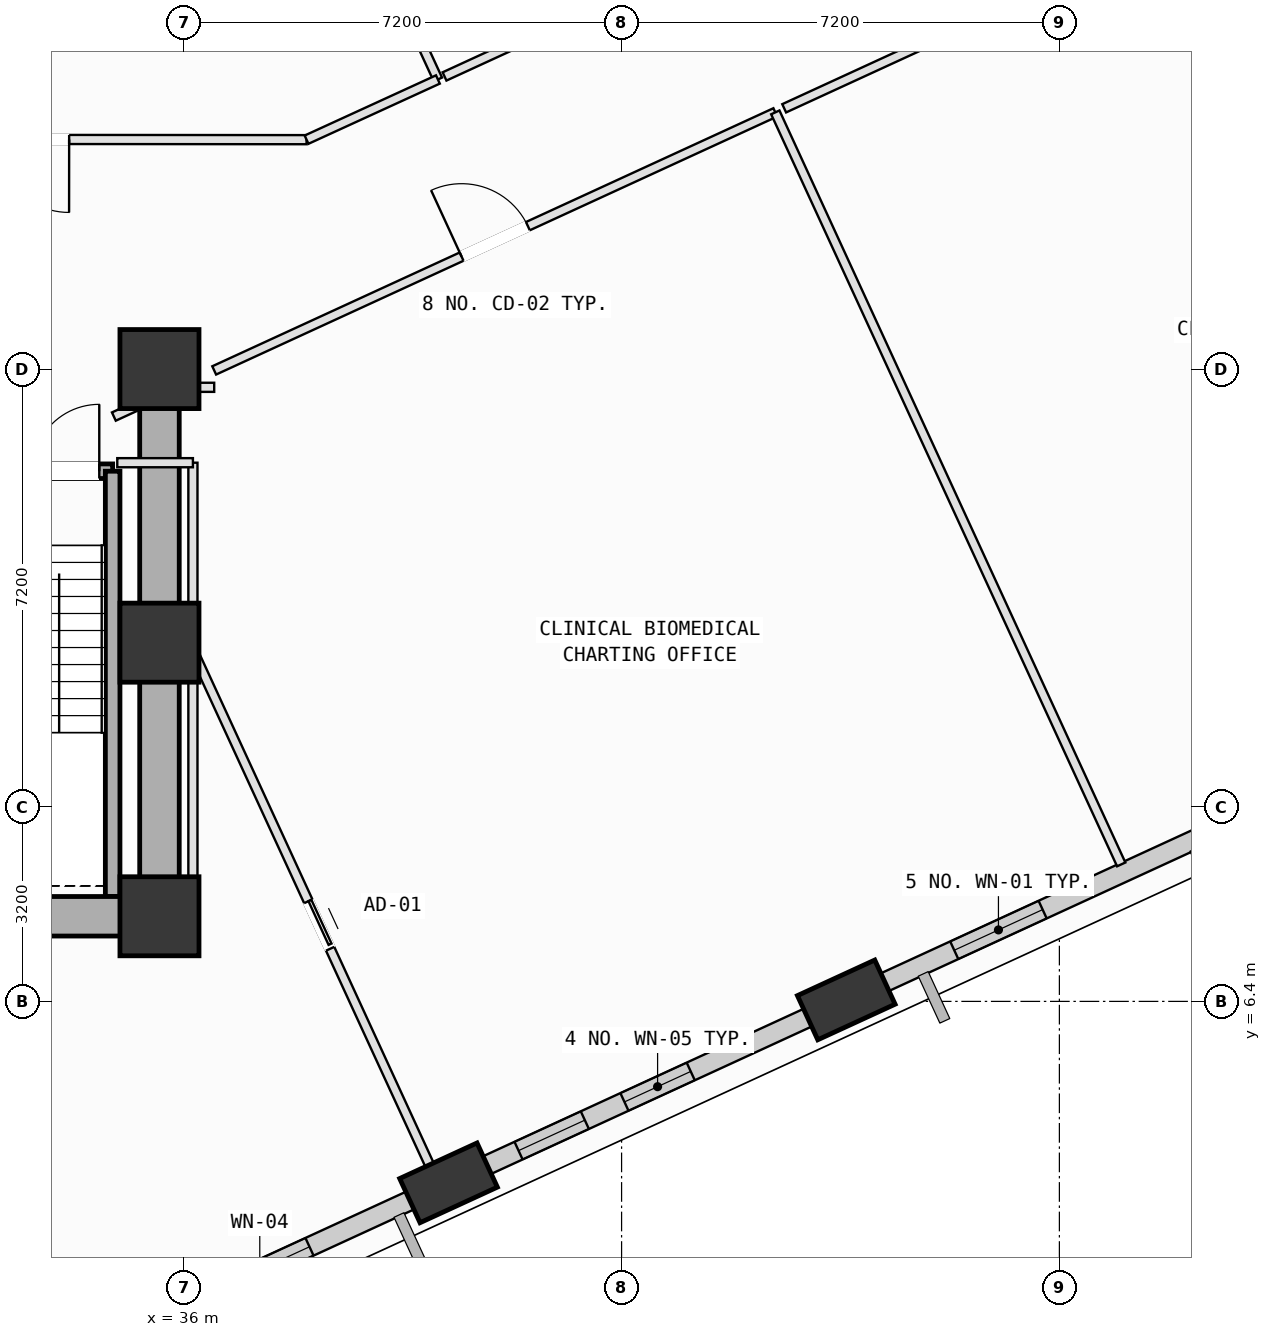
"""IFC4 building model, lengths in metres.
Left out: names, types, materials, properties, quantities, classifications, styles, units other than length and angle.
Written with IfcOpenShell. Run it as: python <this file> out.ifc"""

import sys

from ifc_helpers import new_model, si_unit, direction, frame, frame_2d, origin, origin_2d, place, context, subcontext, project, spatial, rectangle, extrude, element, fill, save


model = new_model("IFC4")
c1 = context("Model", 3, precision=1e-05, world=origin(), true_north=direction((0.0, 1.0)))
c2 = subcontext(c1, "Body", "Model", "MODEL_VIEW")
j1 = project(units=[si_unit("LENGTHUNIT", "METRE"), si_unit("PLANEANGLEUNIT", "RADIAN")], contexts=[c1])
p1 = place(None, origin())
s1 = spatial("IfcSite", under=j1, at=p1, CompositionType="ELEMENT")
p2 = place(p1, origin())
s2 = spatial("IfcBuilding", under=s1, at=p2, CompositionType="ELEMENT")
p3 = place(p2, frame((0.0, 0.0, 128.4)))
s3 = spatial("IfcBuildingStorey", under=s2, at=p3, CompositionType="ELEMENT", Elevation=128.4)
for number, where, z_axis, x_axis in (
    (1, (35.6, 7.8, 0.0), (0.0, 0.0, 1.0), (1.0, 0.0, 0.0)),
    (2, (35.6, 12.3, 0.0), (0.0, 0.0, 1.0), (1.0, 0.0, 0.0)),
    (3, (35.6, 16.8, 0.0), (0.0, 0.0, 1.0), (1.0, 0.0, 0.0)),
):
    element("IfcColumn", number, at=place(p3, frame(where, z_axis=z_axis, x_axis=x_axis)), inside=s3, PredefinedType="COLUMN", context=c2, shape_type="SweptSolid", body=[
        extrude(rectangle(XDim=1.3, YDim=1.3, at=origin_2d()), origin(), (0.0, 0.0, 1.0), 4.0),
    ])
p4 = place(p3, frame((40.354, 3.416, 0.002), z_axis=(0.088079787363, 0.028589433744, 0.995703065847), x_axis=(-0.6762297201, 0.735673833604, 0.038695945562)))
e4 = element("IfcColumn", 4, at=p4, inside=s3, PredefinedType="COLUMN", context=c2, shape_type="SweptSolid", body=[
    extrude(rectangle(XDim=1.4, YDim=0.8, at=origin_2d()), origin(), (0.0, 0.0, 1.0), 4.014),
])
p5 = place(p3, frame((46.895, 6.424, 0.002), z_axis=(0.075419968591, 0.055530993003, 0.995604407962), x_axis=(-0.873680391511, 0.484923595173, 0.039136687829)))
e5 = element("IfcColumn", 5, at=p5, inside=s3, PredefinedType="COLUMN", context=c2, shape_type="SweptSolid", body=[
    extrude(rectangle(XDim=1.4, YDim=0.8, at=origin_2d()), origin(), (0.0, 0.0, 1.0), 4.014),
])
p6 = place(p3, frame((40.071, 3.286, 0.0), z_axis=(0.0, 0.0, 1.0), x_axis=(-0.908512825145, -0.417856969005, 0.0)))
e6 = element("IfcWall", 6, at=p6, inside=s3, PredefinedType="SOLIDWALL", context=c2, shape_type="SweptSolid", body=[
    extrude(rectangle(XDim=6.214, YDim=0.32, at=frame_2d((3.107, 0.0))), origin(), (0.0, 0.0, 1.0), 3.165),
])
p7 = place(p6, frame((2.206, 0.0, 0.75)))
e7 = element("IfcOpeningElement", 7, at=p7, cuts=e6, PredefinedType="OPENING", context=c2, shape_type="SweptSolid", body=[
    extrude(rectangle(XDim=1.8, YDim=2.05, at=frame_2d((0.9, 1.025))), frame((0.0, 0.17, 0.0), z_axis=(0.0, -1.0, 0.0), x_axis=(1.0, 0.0, 0.0)), (0.0, 0.0, 1.0), 0.34),
])
p8 = place(p3, frame((46.613, 6.294, 0.0), z_axis=(0.0, 0.0, 1.0), x_axis=(-0.90850985902, -0.417863417953, 0.0)))
e8 = element("IfcWall", 8, at=p8, inside=s3, PredefinedType="SOLIDWALL", context=c2, shape_type="SweptSolid", body=[
    extrude(rectangle(XDim=6.209, YDim=0.32, at=frame_2d((3.104, 0.0))), origin(), (0.0, 0.0, 1.0), 3.165),
])
p9 = place(p8, frame((2.505, 0.0, 0.75)))
e9 = element("IfcOpeningElement", 9, at=p9, cuts=e8, PredefinedType="OPENING", context=c2, shape_type="SweptSolid", body=[
    extrude(rectangle(XDim=1.2, YDim=1.75, at=frame_2d((0.6, 0.875))), frame((0.0, 0.17, 0.0), z_axis=(0.0, -1.0, 0.0), x_axis=(1.0, 0.0, 0.0)), (0.0, 0.0, 1.0), 0.34),
])
p10 = place(p8, frame((4.422, 0.0, 0.75)))
e10 = element("IfcOpeningElement", 10, at=p10, cuts=e8, PredefinedType="OPENING", context=c2, shape_type="SweptSolid", body=[
    extrude(rectangle(XDim=1.2, YDim=1.75, at=frame_2d((0.6, 0.875))), frame((0.0, 0.17, 0.0), z_axis=(0.0, -1.0, 0.0), x_axis=(1.0, 0.0, 0.0)), (0.0, 0.0, 1.0), 0.34),
])
p11 = place(p3, frame((53.161, 9.306, 0.0), z_axis=(0.0, 0.0, 1.0), x_axis=(-0.908511320159, -0.41786024116, 0.0)))
e11 = element("IfcWall", 11, at=p11, inside=s3, PredefinedType="SOLIDWALL", context=c2, shape_type="SweptSolid", body=[
    extrude(rectangle(XDim=6.218, YDim=0.32, at=frame_2d((3.109, 0.0))), origin(), (0.0, 0.0, 1.0), 3.165),
])
p12 = place(p11, frame((3.342, 0.0, 0.75)))
e12 = element("IfcOpeningElement", 12, at=p12, cuts=e11, PredefinedType="OPENING", context=c2, shape_type="SweptSolid", body=[
    extrude(rectangle(XDim=1.6, YDim=1.95, at=frame_2d((0.8, 0.975))), frame((0.0, 0.17, 0.0), z_axis=(0.0, -1.0, 0.0), x_axis=(1.0, 0.0, 0.0)), (0.0, 0.0, 1.0), 0.34),
])
p13 = place(p3, frame((28.672, 21.048, 0.0), z_axis=(0.0, 0.0, 1.0), x_axis=(0.908511291262, 0.417860303989, 0.0)))
e13 = element("IfcWall", 13, at=p13, inside=s3, PredefinedType="SOLIDWALL", context=c2, shape_type="SweptSolid", body=[
    extrude(rectangle(XDim=5.96, YDim=0.32, at=frame_2d((2.98, 0.0))), origin(), (0.0, 0.0, 1.0), 3.165),
])
p14 = place(p3, frame((31.37, 15.12, 0.0), z_axis=(0.0, 0.0, 1.0), x_axis=(1.0, 0.0, 0.0)))
e14 = element("IfcWall", 14, at=p14, inside=s3, PredefinedType="SOLIDWALL", context=c2, shape_type="SweptSolid", body=[
    extrude(rectangle(XDim=3.46, YDim=0.24, at=frame_2d((1.73, 0.0))), origin(), (0.0, 0.0, 1.0), 3.78),
])
p15 = place(p14, frame((2.14, 0.0, 0.0)))
e15 = element("IfcOpeningElement", 15, at=p15, cuts=e14, PredefinedType="OPENING", context=c2, shape_type="SweptSolid", body=[
    extrude(rectangle(XDim=1.1, YDim=2.15, at=frame_2d((0.55, 1.075))), frame((0.0, 0.13, 0.0), z_axis=(0.0, -1.0, 0.0), x_axis=(1.0, 0.0, 0.0)), (0.0, 0.0, 1.0), 0.26),
])
p16 = place(p3, frame((34.83, 15.12, 0.0), z_axis=(0.0, 0.0, 1.0), x_axis=(0.0, -1.0, 0.0)))
e16 = element("IfcWall", 16, at=p16, inside=s3, PredefinedType="SOLIDWALL", context=c2, shape_type="SweptSolid", body=[
    extrude(rectangle(XDim=6.995, YDim=0.24, at=frame_2d((3.498, 0.0))), origin(), (0.0, 0.0, 1.0), 3.78),
])
p17 = place(p3, frame((24.8, 7.8, 0.0), z_axis=(0.0, 0.0, 1.0), x_axis=(1.0, 0.0, 0.0)))
e17 = element("IfcWall", 17, at=p17, inside=s3, PredefinedType="SHEAR", context=c2, shape_type="SweptSolid", body=[
    extrude(rectangle(XDim=10.8, YDim=0.65, at=frame_2d((5.4, 0.0))), origin(), (0.0, 0.0, 1.0), 3.78),
])
p18 = place(p3, frame((35.6, 7.8, 0.0), z_axis=(0.0, 0.0, 1.0), x_axis=(0.0, 1.0, 0.0)))
e18 = element("IfcWall", 18, at=p18, inside=s3, PredefinedType="SHEAR", context=c2, shape_type="SweptSolid", body=[
    extrude(rectangle(XDim=9.0, YDim=0.65, at=frame_2d((4.5, 0.0))), origin(), (0.0, 0.0, 1.0), 3.78),
])
p19 = place(p3, frame((36.15, 12.172, 0.0), z_axis=(0.0, 0.0, 1.0), x_axis=(0.41784155891, -0.908519912631, 0.0)))
e19 = element("IfcWall", 19, at=p19, inside=s3, PredefinedType="PARTITIONING", context=c2, shape_type="SweptSolid", body=[
    extrude(rectangle(XDim=9.942, YDim=0.15, at=frame_2d((4.971, 0.0))), origin(), (0.0, 0.0, 1.0), 3.78),
])
p20 = place(p19, frame((4.541, 0.0, 0.0)))
e20 = element("IfcOpeningElement", 20, at=p20, cuts=e19, PredefinedType="OPENING", context=c2, shape_type="SweptSolid", body=[
    extrude(rectangle(XDim=0.86, YDim=2.06, at=frame_2d((0.43, 1.03))), frame((0.0, 0.085, 0.0), z_axis=(0.0, -1.0, 0.0), x_axis=(1.0, 0.0, 0.0)), (0.0, 0.0, 1.0), 0.17),
])
p21 = place(p3, frame((35.6, 7.5, 0.0), z_axis=(0.0, 0.0, 1.0), x_axis=(1.0, 0.0, 0.0)))
e21 = element("IfcWall", 21, at=p21, inside=s3, PredefinedType="PARTITIONING", context=c2, shape_type="SweptSolid", body=[
    extrude(rectangle(XDim=0.55, YDim=0.15, at=frame_2d((0.275, 0.0))), origin(), (0.0, 0.0, 1.0), 2.965),
])
p22 = place(p3, frame((36.15, 7.5, 0.0), z_axis=(0.0, 0.0, 1.0), x_axis=(0.0, 1.0, 0.0)))
e22 = element("IfcWall", 22, at=p22, inside=s3, PredefinedType="PARTITIONING", context=c2, shape_type="SweptSolid", body=[
    extrude(rectangle(XDim=4.672, YDim=0.15, at=frame_2d((2.336, 0.0))), origin(), (0.0, 0.0, 1.0), 3.78),
])
p23 = place(p3, frame((34.85, 16.019, 0.0), z_axis=(0.0, 0.0, 1.0), x_axis=(0.908541977425, 0.417793579722, 0.0)))
e23 = element("IfcWall", 23, at=p23, inside=s3, PredefinedType="PARTITIONING", context=c2, shape_type="SweptSolid", body=[
    extrude(rectangle(XDim=1.151, YDim=0.15, at=frame_2d((0.576, 0.0))), origin(), (0.0, 0.0, 1.0), 2.945),
])
p24 = place(p3, frame((35.896, 16.5, 0.0), z_axis=(0.0, 0.0, 1.0), x_axis=(1.0, 0.0, 0.0)))
e24 = element("IfcWall", 24, at=p24, inside=s3, PredefinedType="PARTITIONING", context=c2, shape_type="SweptSolid", body=[
    extrude(rectangle(XDim=0.604, YDim=0.15, at=frame_2d((0.302, 0.0))), origin(), (0.0, 0.0, 1.0), 2.965),
])
p25 = place(p3, frame((36.5, 16.778, 0.0), z_axis=(0.0, 0.0, 1.0), x_axis=(0.908527682077, 0.417824665261, 0.0)))
e25 = element("IfcWall", 25, at=p25, inside=s3, PredefinedType="PARTITIONING", context=c2, shape_type="SweptSolid", body=[
    extrude(rectangle(XDim=10.157, YDim=0.15, at=frame_2d((5.079, 0.0))), origin(), (0.0, 0.0, 1.0), 2.965),
])
p26 = place(p25, frame((4.479, 0.0, 0.0)))
e26 = element("IfcOpeningElement", 26, at=p26, cuts=e25, PredefinedType="OPENING", context=c2, shape_type="SweptSolid", body=[
    extrude(rectangle(XDim=1.2, YDim=2.15, at=frame_2d((0.6, 1.075))), frame((0.0, 0.085, 0.0), z_axis=(0.0, -1.0, 0.0), x_axis=(1.0, 0.0, 0.0)), (0.0, 0.0, 1.0), 0.17),
])
p27 = place(p3, frame((45.728, 21.022, 0.0), z_axis=(0.0, 0.0, 1.0), x_axis=(0.417861501893, -0.908510740297, 0.0)))
e27 = element("IfcWall", 27, at=p27, inside=s3, PredefinedType="PARTITIONING", context=c2, shape_type="SweptSolid", body=[
    extrude(rectangle(XDim=13.615, YDim=0.15, at=frame_2d((6.807, 0.0))), origin(), (0.0, 0.0, 1.0), 3.78),
])
p28 = place(p3, frame((47.608, 6.499, 0.0), z_axis=(0.0, 0.0, 1.0), x_axis=(-0.908276799682, -0.418369758897, 0.0)))
e28 = element("IfcWall", 28, at=p28, inside=s3, PredefinedType="PARTITIONING", context=c2, shape_type="SweptSolid", body=[
    extrude(rectangle(XDim=0.99, YDim=0.15, at=frame_2d((0.495, 0.0))), origin(), (0.0, 0.0, 1.0), 3.165),
])
p29 = place(p3, frame((41.068, 3.491, 0.0), z_axis=(0.0, 0.0, 1.0), x_axis=(-0.908724676368, -0.417396050006, 0.0)))
e29 = element("IfcWall", 29, at=p29, inside=s3, PredefinedType="PARTITIONING", context=c2, shape_type="SweptSolid", body=[
    extrude(rectangle(XDim=0.68, YDim=0.15, at=frame_2d((0.34, 0.0))), origin(), (0.0, 0.0, 1.0), 3.165),
])
p30 = place(p3, frame((36.15, 12.555, 0.0), z_axis=(0.0, 0.0, 1.0), x_axis=(0.0, 1.0, 0.0)))
e30 = element("IfcWall", 30, at=p30, inside=s3, PredefinedType="PARTITIONING", context=c2, shape_type="SweptSolid", body=[
    extrude(rectangle(XDim=2.705, YDim=0.15, at=frame_2d((1.353, 0.0))), origin(), (0.0, 0.0, 1.0), 3.78),
])
p31 = place(p3, frame((36.15, 15.26, 0.0), z_axis=(0.0, 0.0, 1.0), x_axis=(-1.0, 0.0, 0.0)))
e31 = element("IfcWall", 31, at=p31, inside=s3, PredefinedType="PARTITIONING", context=c2, shape_type="SweptSolid", body=[
    extrude(rectangle(XDim=1.244, YDim=0.15, at=frame_2d((0.622, 0.0))), origin(), (0.0, 0.0, 1.0), 3.78),
])
p32 = place(p3, frame((45.874, 21.089, 0.0), z_axis=(0.0, 0.0, 1.0), x_axis=(0.90849514781, 0.417895401273, 0.0)))
e32 = element("IfcWall", 32, at=p32, inside=s3, PredefinedType="PARTITIONING", context=c2, shape_type="SweptSolid", body=[
    extrude(rectangle(XDim=12.24, YDim=0.15, at=frame_2d((6.12, 0.0))), origin(), (0.0, 0.0, 1.0), 3.78),
])
p33 = place(p32, frame((5.52, 0.0, 0.0)))
e33 = element("IfcOpeningElement", 33, at=p33, cuts=e32, PredefinedType="OPENING", context=c2, shape_type="SweptSolid", body=[
    extrude(rectangle(XDim=1.2, YDim=2.15, at=frame_2d((0.6, 1.075))), frame((0.0, 0.085, 0.0), z_axis=(0.0, -1.0, 0.0), x_axis=(1.0, 0.0, 0.0)), (0.0, 0.0, 1.0), 0.17),
])
p34 = place(p3, frame((38.019, 20.573, 0.0), z_axis=(0.0, 0.0, 1.0), x_axis=(-0.999999691191, 0.000785886319, 0.0)))
e34 = element("IfcWall", 34, at=p34, inside=s3, PredefinedType="PARTITIONING", context=c2, shape_type="SweptSolid", body=[
    extrude(rectangle(XDim=9.009, YDim=0.15, at=frame_2d((4.504, 0.0))), origin(), (0.0, 0.0, 1.0), 3.365),
])
p35 = place(p34, frame((3.905, 0.0, 0.0)))
e35 = element("IfcOpeningElement", 35, at=p35, cuts=e34, PredefinedType="OPENING", context=c2, shape_type="SweptSolid", body=[
    extrude(rectangle(XDim=1.2, YDim=2.15, at=frame_2d((0.6, 1.075))), frame((0.0, 0.085, 0.0), z_axis=(0.0, -1.0, 0.0), x_axis=(1.0, 0.0, 0.0)), (0.0, 0.0, 1.0), 0.17),
])
p36 = place(p3, frame((28.483, 21.566, 0.0), z_axis=(0.0, 0.0, 1.0), x_axis=(0.908526220932, 0.417827842393, 0.0)))
e36 = element("IfcWall", 36, at=p36, inside=s3, PredefinedType="PARTITIONING", context=c2, shape_type="SweptSolid", body=[
    extrude(rectangle(XDim=10.624, YDim=0.15, at=frame_2d((5.312, 0.0))), origin(), (0.0, 0.0, 1.0), 3.78),
])
p37 = place(p3, frame((38.421, 25.383, 0.0), z_axis=(0.0, 0.0, 1.0), x_axis=(0.418067562833, -0.908415936071, 0.0)))
e37 = element("IfcWall", 37, at=p37, inside=s3, PredefinedType="PARTITIONING", context=c2, shape_type="SweptSolid", body=[
    extrude(rectangle(XDim=4.205, YDim=0.15, at=frame_2d((2.103, 0.0))), origin(), (0.0, 0.0, 1.0), 3.78),
])
p38 = place(p3, frame((40.179, 21.563, 0.0), z_axis=(0.0, 0.0, 1.0), x_axis=(-0.90905995789, -0.416665324884, 0.0)))
e38 = element("IfcWall", 38, at=p38, inside=s3, PredefinedType="PARTITIONING", context=c2, shape_type="SweptSolid", body=[
    extrude(rectangle(XDim=2.376, YDim=0.15, at=frame_2d((1.188, 0.0))), origin(), (0.0, 0.0, 1.0), 2.945),
])
p39 = place(p3, frame((55.678, 28.692, 0.0), z_axis=(0.0, 0.0, 1.0), x_axis=(-0.908501505358, -0.417881579832, 0.0)))
e39 = element("IfcWall", 39, at=p39, inside=s3, PredefinedType="PARTITIONING", context=c2, shape_type="SweptSolid", body=[
    extrude(rectangle(XDim=16.94, YDim=0.15, at=frame_2d((8.47, 0.0))), origin(), (0.0, 0.0, 1.0), 2.945),
])
p40 = place(p39, frame((7.87, 0.0, 0.0)))
e40 = element("IfcOpeningElement", 40, at=p40, cuts=e39, PredefinedType="OPENING", context=c2, shape_type="SweptSolid", body=[
    extrude(rectangle(XDim=1.2, YDim=2.15, at=frame_2d((0.6, 1.075))), frame((0.0, 0.085, 0.0), z_axis=(0.0, -1.0, 0.0), x_axis=(1.0, 0.0, 0.0)), (0.0, 0.0, 1.0), 0.17),
])
p41 = place(p7, origin())
e41 = element("IfcWindow", 41, at=p41, inside=s3, PartitioningType="SINGLE_PANEL", PredefinedType="WINDOW", context=c2, shape_type="SweptSolid", body=[
    extrude(rectangle(XDim=1.8, YDim=2.05, at=frame_2d((0.9, 1.025))), frame((0.0, 0.03, 0.0), z_axis=(0.0, -1.0, 0.0), x_axis=(1.0, 0.0, 0.0)), (0.0, 0.0, 1.0), 0.06),
])
fill(e7, e41)
p42 = place(p9, origin())
e42 = element("IfcWindow", 42, at=p42, inside=s3, PartitioningType="SINGLE_PANEL", PredefinedType="WINDOW", context=c2, shape_type="SweptSolid", body=[
    extrude(rectangle(XDim=1.2, YDim=1.75, at=frame_2d((0.6, 0.875))), frame((0.0, 0.03, 0.0), z_axis=(0.0, -1.0, 0.0), x_axis=(1.0, 0.0, 0.0)), (0.0, 0.0, 1.0), 0.06),
])
fill(e9, e42)
p43 = place(p10, origin())
e43 = element("IfcWindow", 43, at=p43, inside=s3, PartitioningType="SINGLE_PANEL", PredefinedType="WINDOW", context=c2, shape_type="SweptSolid", body=[
    extrude(rectangle(XDim=1.2, YDim=1.75, at=frame_2d((0.6, 0.875))), frame((0.0, 0.03, 0.0), z_axis=(0.0, -1.0, 0.0), x_axis=(1.0, 0.0, 0.0)), (0.0, 0.0, 1.0), 0.06),
])
fill(e10, e43)
p44 = place(p12, origin())
e44 = element("IfcWindow", 44, at=p44, inside=s3, PartitioningType="SINGLE_PANEL", PredefinedType="WINDOW", context=c2, shape_type="SweptSolid", body=[
    extrude(rectangle(XDim=1.6, YDim=1.95, at=frame_2d((0.8, 0.975))), frame((0.0, 0.03, 0.0), z_axis=(0.0, -1.0, 0.0), x_axis=(1.0, 0.0, 0.0)), (0.0, 0.0, 1.0), 0.06),
])
fill(e12, e44)
p45 = place(p15, origin())
e45 = element("IfcDoor", 45, at=p45, inside=s3, OperationType="SINGLE_SWING_RIGHT", PredefinedType="DOOR", context=c2, shape_type="SweptSolid", body=[
    extrude(rectangle(XDim=1.1, YDim=2.15, at=frame_2d((0.55, 1.075))), frame((0.0, 0.025, 0.0), z_axis=(0.0, -1.0, 0.0), x_axis=(1.0, 0.0, 0.0)), (0.0, 0.0, 1.0), 0.05),
])
fill(e15, e45)
p46 = place(p26, origin())
e46 = element("IfcDoor", 46, at=p46, inside=s3, OperationType="SINGLE_SWING_LEFT", PredefinedType="DOOR", context=c2, shape_type="SweptSolid", body=[
    extrude(rectangle(XDim=1.2, YDim=2.15, at=frame_2d((0.6, 1.075))), frame((0.0, 0.025, 0.0), z_axis=(0.0, -1.0, 0.0), x_axis=(1.0, 0.0, 0.0)), (0.0, 0.0, 1.0), 0.05),
])
fill(e26, e46)
p47 = place(p35, origin())
e47 = element("IfcDoor", 47, at=p47, inside=s3, OperationType="SINGLE_SWING_LEFT", PredefinedType="DOOR", context=c2, shape_type="SweptSolid", body=[
    extrude(rectangle(XDim=1.2, YDim=2.15, at=frame_2d((0.6, 1.075))), frame((0.0, 0.025, 0.0), z_axis=(0.0, -1.0, 0.0), x_axis=(1.0, 0.0, 0.0)), (0.0, 0.0, 1.0), 0.05),
])
fill(e35, e47)
p48 = place(p20, origin())
e48 = element("IfcDoor", 48, at=p48, inside=s3, OperationType="SLIDING_TO_LEFT", PredefinedType="DOOR", context=c2, shape_type="SweptSolid", body=[
    extrude(rectangle(XDim=0.86, YDim=2.06, at=frame_2d((0.43, 1.03))), frame((0.0, 0.025, 0.0), z_axis=(0.0, -1.0, 0.0), x_axis=(1.0, 0.0, 0.0)), (0.0, 0.0, 1.0), 0.05),
])
fill(e20, e48)
save(model, sys.argv[1])
